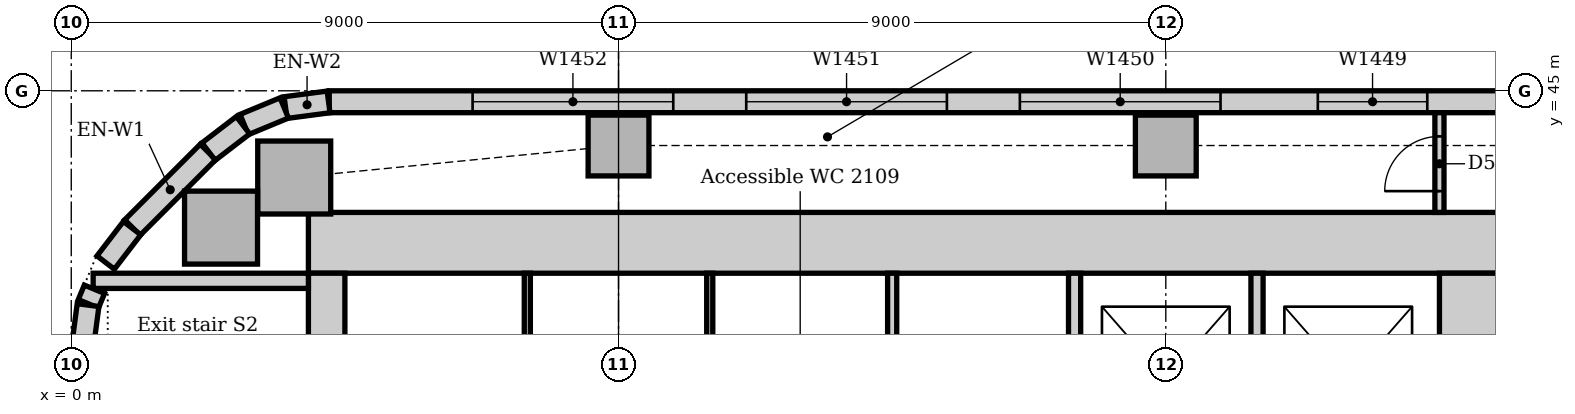
"""IFC4 building model, lengths in metres.
Left out: names, types, materials, properties, quantities, classifications, styles, units other than length and angle.
Written with IfcOpenShell. Run it as: python <this file> out.ifc"""

import sys

from ifc_helpers import new_model, si_unit, direction, frame, frame_2d, origin, origin_2d, place, context, subcontext, project, spatial, rectangle, extrude, element, fill, save


model = new_model("IFC4")
c1 = context("Model", 3, precision=1e-05, world=origin(), true_north=direction((0.0, 1.0)))
c2 = subcontext(c1, "Body", "Model", "MODEL_VIEW")
j1 = project(units=[si_unit("LENGTHUNIT", "METRE"), si_unit("PLANEANGLEUNIT", "RADIAN")], contexts=[c1])
p1 = place(None, origin())
s1 = spatial("IfcSite", under=j1, at=p1, CompositionType="ELEMENT")
p2 = place(p1, origin())
s2 = spatial("IfcBuilding", under=s1, at=p2, CompositionType="ELEMENT")
p3 = place(p2, frame((0.0, 0.0, 91.0)))
s3 = spatial("IfcBuildingStorey", under=s2, at=p3, CompositionType="ELEMENT", Elevation=91.0)
p4 = place(p3, frame((23.5, 42.5, 0.0), z_axis=(0.0, 0.0, 1.0), x_axis=(-1.0, 0.0, 0.0)))
e1 = element("IfcWall", 1, at=p4, inside=s3, PredefinedType="SOLIDWALL", context=c2, shape_type="SweptSolid", body=[
    extrude(rectangle(XDim=19.6, YDim=1.0, at=frame_2d((9.8, 0.0))), origin(), (0.0, 0.0, 1.0), 4.0),
])
p5 = place(p3, frame((23.0, 31.5, 0.0), z_axis=(0.0, 0.0, 1.0), x_axis=(0.0, 1.0, 0.0)))
e2 = element("IfcWall", 2, at=p5, inside=s3, PredefinedType="SOLIDWALL", context=c2, shape_type="SweptSolid", body=[
    extrude(rectangle(XDim=10.5, YDim=1.0, at=frame_2d((5.25, 0.0))), origin(), (0.0, 0.0, 1.0), 4.0),
])
p6 = place(p5, frame((3.15, 0.0, 0.0)))
e3 = element("IfcOpeningElement", 3, at=p6, cuts=e2, PredefinedType="OPENING", context=c2, shape_type="SweptSolid", body=[
    extrude(rectangle(XDim=1.0, YDim=2.1, at=frame_2d((0.5, 1.05))), frame((0.0, 0.51, 0.0), z_axis=(0.0, -1.0, 0.0), x_axis=(1.0, 0.0, 0.0)), (0.0, 0.0, 1.0), 1.02),
])
p7 = place(p5, frame((5.2, 0.0, 0.0)))
e4 = element("IfcOpeningElement", 4, at=p7, cuts=e2, PredefinedType="OPENING", context=c2, shape_type="SweptSolid", body=[
    extrude(rectangle(XDim=1.0, YDim=2.1, at=frame_2d((0.5, 1.05))), frame((0.0, 0.51, 0.0), z_axis=(0.0, -1.0, 0.0), x_axis=(1.0, 0.0, 0.0)), (0.0, 0.0, 1.0), 1.02),
])
p8 = place(p3, frame((4.2, 42.0, 0.0), z_axis=(0.0, 0.0, 1.0), x_axis=(0.0, -1.0, 0.0)))
e5 = element("IfcWall", 5, at=p8, inside=s3, PredefinedType="SOLIDWALL", context=c2, shape_type="SweptSolid", body=[
    extrude(rectangle(XDim=10.5, YDim=0.6, at=frame_2d((5.25, 0.0))), origin(), (0.0, 0.0, 1.0), 4.0),
])
p9 = place(p8, frame((5.3, 0.0, 0.0)))
e6 = element("IfcOpeningElement", 6, at=p9, cuts=e5, PredefinedType="OPENING", context=c2, shape_type="SweptSolid", body=[
    extrude(rectangle(XDim=1.0, YDim=2.1, at=frame_2d((0.5, 1.05))), frame((0.0, 0.31, 0.0), z_axis=(0.0, -1.0, 0.0), x_axis=(1.0, 0.0, 0.0)), (0.0, 0.0, 1.0), 0.62),
])
p10 = place(p3, frame((3.9, 41.875, 0.0), z_axis=(0.0, 0.0, 1.0), x_axis=(-1.0, 0.0, 0.0)))
e7 = element("IfcWall", 7, at=p10, inside=s3, PredefinedType="SOLIDWALL", context=c2, shape_type="SweptSolid", body=[
    extrude(rectangle(XDim=3.54, YDim=0.25, at=frame_2d((1.77, 0.0))), origin(), (0.0, 0.0, 1.0), 4.0),
])
for number, where, z_axis, x_axis in (
    (8, (3.667, 43.574, 0.0), (0.0, 0.0, 1.0), (1.0, 0.0, 0.0)),
    (9, (2.463, 42.75, 0.0), (0.0, 0.0, 1.0), (1.0, 0.0, 0.0)),
):
    element("IfcColumn", number, at=place(p3, frame(where, z_axis=z_axis, x_axis=x_axis)), inside=s3, PredefinedType="COLUMN", context=c2, shape_type="SweptSolid", body=[
        extrude(rectangle(XDim=1.2, YDim=1.2, at=origin_2d()), origin(), (0.0, 0.0, 1.0), 3.7),
    ])
for number, where, z_axis, x_axis in (
    (10, (9.0, 44.1, 0.0), (0.0, 0.0, 1.0), (1.0, 0.0, 0.0)),
    (11, (18.0, 44.1, 0.0), (0.0, 0.0, 1.0), (1.0, 0.0, 0.0)),
):
    element("IfcColumn", number, at=place(p3, frame(where, z_axis=z_axis, x_axis=x_axis)), inside=s3, PredefinedType="COLUMN", context=c2, shape_type="SweptSolid", body=[
        extrude(rectangle(XDim=1.0, YDim=1.0, at=origin_2d()), origin(), (0.0, 0.0, 1.0), 3.7),
    ])
p11 = place(p3, frame((48.257, 44.82, 0.0), z_axis=(0.0, 0.0, 1.0), x_axis=(-1.0, 0.0, 0.0)))
e12 = element("IfcWall", 12, at=p11, inside=s3, PredefinedType="STANDARD", context=c2, shape_type="SweptSolid", body=[
    extrude(rectangle(XDim=44.015, YDim=0.36, at=frame_2d((22.007, 0.0))), origin(), (0.0, 0.0, 1.0), 3.7),
])
p12 = place(p11, frame((2.357, 0.0, 0.9)))
e13 = element("IfcOpeningElement", 13, at=p12, cuts=e12, PredefinedType="OPENING", context=c2, shape_type="SweptSolid", body=[
    extrude(rectangle(XDim=3.3, YDim=1.6, at=frame_2d((1.65, 0.8))), frame((0.0, 0.19, 0.0), z_axis=(0.0, -1.0, 0.0), x_axis=(1.0, 0.0, 0.0)), (0.0, 0.0, 1.0), 0.38),
])
p13 = place(p11, frame((6.857, 0.0, 0.9)))
e14 = element("IfcOpeningElement", 14, at=p13, cuts=e12, PredefinedType="OPENING", context=c2, shape_type="SweptSolid", body=[
    extrude(rectangle(XDim=3.3, YDim=1.6, at=frame_2d((1.65, 0.8))), frame((0.0, 0.19, 0.0), z_axis=(0.0, -1.0, 0.0), x_axis=(1.0, 0.0, 0.0)), (0.0, 0.0, 1.0), 0.38),
])
p14 = place(p11, frame((11.357, 0.0, 0.9)))
e15 = element("IfcOpeningElement", 15, at=p14, cuts=e12, PredefinedType="OPENING", context=c2, shape_type="SweptSolid", body=[
    extrude(rectangle(XDim=3.3, YDim=1.6, at=frame_2d((1.65, 0.8))), frame((0.0, 0.19, 0.0), z_axis=(0.0, -1.0, 0.0), x_axis=(1.0, 0.0, 0.0)), (0.0, 0.0, 1.0), 0.38),
])
p15 = place(p11, frame((15.857, 0.0, 0.9)))
e16 = element("IfcOpeningElement", 16, at=p15, cuts=e12, PredefinedType="OPENING", context=c2, shape_type="SweptSolid", body=[
    extrude(rectangle(XDim=3.3, YDim=1.6, at=frame_2d((1.65, 0.8))), frame((0.0, 0.19, 0.0), z_axis=(0.0, -1.0, 0.0), x_axis=(1.0, 0.0, 0.0)), (0.0, 0.0, 1.0), 0.38),
])
p16 = place(p11, frame((20.357, 0.0, 0.9)))
e17 = element("IfcOpeningElement", 17, at=p16, cuts=e12, PredefinedType="OPENING", context=c2, shape_type="SweptSolid", body=[
    extrude(rectangle(XDim=3.3, YDim=1.6, at=frame_2d((1.65, 0.8))), frame((0.0, 0.19, 0.0), z_axis=(0.0, -1.0, 0.0), x_axis=(1.0, 0.0, 0.0)), (0.0, 0.0, 1.0), 0.38),
])
p17 = place(p11, frame((25.957, 0.0, 0.9)))
e18 = element("IfcOpeningElement", 18, at=p17, cuts=e12, PredefinedType="OPENING", context=c2, shape_type="SweptSolid", body=[
    extrude(rectangle(XDim=1.8, YDim=1.6, at=frame_2d((0.9, 0.8))), frame((0.0, 0.19, 0.0), z_axis=(0.0, -1.0, 0.0), x_axis=(1.0, 0.0, 0.0)), (0.0, 0.0, 1.0), 0.38),
])
p18 = place(p11, frame((29.357, 0.0, 0.9)))
e19 = element("IfcOpeningElement", 19, at=p18, cuts=e12, PredefinedType="OPENING", context=c2, shape_type="SweptSolid", body=[
    extrude(rectangle(XDim=3.3, YDim=1.6, at=frame_2d((1.65, 0.8))), frame((0.0, 0.19, 0.0), z_axis=(0.0, -1.0, 0.0), x_axis=(1.0, 0.0, 0.0)), (0.0, 0.0, 1.0), 0.38),
])
p19 = place(p11, frame((33.857, 0.0, 0.9)))
e20 = element("IfcOpeningElement", 20, at=p19, cuts=e12, PredefinedType="OPENING", context=c2, shape_type="SweptSolid", body=[
    extrude(rectangle(XDim=3.3, YDim=1.6, at=frame_2d((1.65, 0.8))), frame((0.0, 0.19, 0.0), z_axis=(0.0, -1.0, 0.0), x_axis=(1.0, 0.0, 0.0)), (0.0, 0.0, 1.0), 0.38),
])
p20 = place(p11, frame((38.357, 0.0, 0.9)))
e21 = element("IfcOpeningElement", 21, at=p20, cuts=e12, PredefinedType="OPENING", context=c2, shape_type="SweptSolid", body=[
    extrude(rectangle(XDim=3.3, YDim=1.6, at=frame_2d((1.65, 0.8))), frame((0.0, 0.19, 0.0), z_axis=(0.0, -1.0, 0.0), x_axis=(1.0, 0.0, 0.0)), (0.0, 0.0, 1.0), 0.38),
])
p21 = place(p3, frame((2.249, 43.994, 0.0), z_axis=(0.0, 0.0, 1.0), x_axis=(-0.707106781187, -0.707106781187, 0.0)))
e22 = element("IfcWall", 22, at=p21, inside=s3, PredefinedType="STANDARD", context=c2, shape_type="SweptSolid", body=[
    extrude(rectangle(XDim=1.757, YDim=0.36, at=frame_2d((0.879, 0.0))), origin(), (0.0, 0.0, 1.0), 3.7),
])
for number, where, z_axis, x_axis in (
    (23, (4.231, 44.817, 0.0), (0.0, 0.0, 1.0), (-0.991, -0.131, 0.0)),
    (24, (3.503, 44.718, 0.0), (0.0, 0.0, 1.0), (-0.924, -0.383, 0.0)),
):
    element("IfcWall", number, at=place(p3, frame(where, z_axis=z_axis, x_axis=x_axis)), inside=s3, PredefinedType="STANDARD", context=c2, shape_type="SweptSolid", body=[
        extrude(rectangle(XDim=0.713, YDim=0.36, at=frame_2d((0.356, 0.0))), origin(), (0.0, 0.0, 1.0), 3.7),
    ])
for number, where, z_axis, x_axis in (
    (25, (2.825, 44.434, 0.0), (0.0, 0.0, 1.0), (-0.793, -0.609, 0.0)),
    (26, (1.0, 42.741, 0.0), (0.0, 0.0, 1.0), (-0.609, -0.793, 0.0)),
):
    element("IfcWall", number, at=place(p3, frame(where, z_axis=z_axis, x_axis=x_axis)), inside=s3, PredefinedType="STANDARD", context=c2, shape_type="SweptSolid", body=[
        extrude(rectangle(XDim=0.713, YDim=0.36, at=frame_2d((0.357, 0.0))), origin(), (0.0, 0.0, 1.0), 3.7),
    ])
p22 = place(p3, frame((0.381, 41.736, 0.0), z_axis=(0.0, 0.0, 1.0), x_axis=(-0.382773360986, -0.923842277729, 0.0)))
e27 = element("IfcWall", 27, at=p22, inside=s3, PredefinedType="STANDARD", context=c2, shape_type="SweptSolid", body=[
    extrude(rectangle(XDim=0.258, YDim=0.36, at=frame_2d((0.129, 0.0))), origin(), (0.0, 0.0, 1.0), 3.7),
])
p23 = place(p3, frame((0.276, 41.476, 0.0), z_axis=(0.0, 0.0, 1.0), x_axis=(-0.13055608231, -0.99144092581, 0.0)))
e28 = element("IfcWall", 28, at=p23, inside=s3, PredefinedType="STANDARD", context=c2, shape_type="SweptSolid", body=[
    extrude(rectangle(XDim=0.713, YDim=0.36, at=frame_2d((0.356, 0.0))), origin(), (0.0, 0.0, 1.0), 3.7),
])
for number, where, z_axis, x_axis in (
    (29, (16.5, 38.6, 0.0), (0.0, 0.0, 1.0), (0.0, 1.0, 0.0)),
    (30, (19.5, 38.6, 0.0), (0.0, 0.0, 1.0), (0.0, 1.0, 0.0)),
):
    element("IfcWall", number, at=place(p3, frame(where, z_axis=z_axis, x_axis=x_axis)), inside=s3, PredefinedType="PARTITIONING", context=c2, shape_type="SweptSolid", body=[
        extrude(rectangle(XDim=3.4, YDim=0.2, at=frame_2d((1.7, 0.0))), origin(), (0.0, 0.0, 1.0), 3.7),
    ])
p24 = place(p3, frame((22.5, 43.0, 0.0), z_axis=(0.0, 0.0, 1.0), x_axis=(0.0, 1.0, 0.0)))
e31 = element("IfcWall", 31, at=p24, inside=s3, PredefinedType="PARTITIONING", context=c2, shape_type="SweptSolid", body=[
    extrude(rectangle(XDim=1.64, YDim=0.15, at=frame_2d((0.82, 0.0))), origin(), (0.0, 0.0, 1.0), 3.7),
])
p25 = place(p24, frame((0.35, 0.0, 0.0)))
e32 = element("IfcOpeningElement", 32, at=p25, cuts=e31, PredefinedType="OPENING", context=c2, shape_type="SweptSolid", body=[
    extrude(rectangle(XDim=0.9, YDim=2.1, at=frame_2d((0.45, 1.05))), frame((0.0, 0.085, 0.0), z_axis=(0.0, -1.0, 0.0), x_axis=(1.0, 0.0, 0.0)), (0.0, 0.0, 1.0), 0.17),
])
p26 = place(p3, frame((13.5, 38.575, 0.0), z_axis=(0.0, 0.0, 1.0), x_axis=(0.0, 1.0, 0.0)))
e33 = element("IfcWall", 33, at=p26, inside=s3, PredefinedType="PARTITIONING", context=c2, shape_type="SweptSolid", body=[
    extrude(rectangle(XDim=3.425, YDim=0.15, at=frame_2d((1.712, 0.0))), origin(), (0.0, 0.0, 1.0), 3.7),
])
for number, where, z_axis, x_axis in (
    (34, (7.5, 38.575, 0.0), (0.0, 0.0, 1.0), (0.0, 1.0, 0.0)),
    (35, (10.5, 38.575, 0.0), (0.0, 0.0, 1.0), (0.0, 1.0, 0.0)),
):
    element("IfcWall", number, at=place(p3, frame(where, z_axis=z_axis, x_axis=x_axis)), inside=s3, PredefinedType="PARTITIONING", context=c2, shape_type="SweptSolid", body=[
        extrude(rectangle(XDim=3.425, YDim=0.1, at=frame_2d((1.712, 0.0))), origin(), (0.0, 0.0, 1.0), 3.7),
    ])
p27 = place(p17, origin())
e36 = element("IfcWindow", 36, at=p27, inside=s3, PartitioningType="SINGLE_PANEL", PredefinedType="WINDOW", context=c2, shape_type="SweptSolid", body=[
    extrude(rectangle(XDim=1.8, YDim=1.6, at=frame_2d((0.9, 0.8))), frame((0.0, 0.13, 0.0), z_axis=(0.0, -1.0, 0.0), x_axis=(1.0, 0.0, 0.0)), (0.0, 0.0, 1.0), 0.06),
])
fill(e18, e36)
p28 = place(p18, origin())
e37 = element("IfcWindow", 37, at=p28, inside=s3, PartitioningType="SINGLE_PANEL", PredefinedType="WINDOW", context=c2, shape_type="SweptSolid", body=[
    extrude(rectangle(XDim=3.3, YDim=1.6, at=frame_2d((1.65, 0.8))), frame((0.0, 0.13, 0.0), z_axis=(0.0, -1.0, 0.0), x_axis=(1.0, 0.0, 0.0)), (0.0, 0.0, 1.0), 0.06),
])
fill(e19, e37)
p29 = place(p19, origin())
e38 = element("IfcWindow", 38, at=p29, inside=s3, PartitioningType="SINGLE_PANEL", PredefinedType="WINDOW", context=c2, shape_type="SweptSolid", body=[
    extrude(rectangle(XDim=3.3, YDim=1.6, at=frame_2d((1.65, 0.8))), frame((0.0, 0.13, 0.0), z_axis=(0.0, -1.0, 0.0), x_axis=(1.0, 0.0, 0.0)), (0.0, 0.0, 1.0), 0.06),
])
fill(e20, e38)
p30 = place(p20, origin())
e39 = element("IfcWindow", 39, at=p30, inside=s3, PartitioningType="SINGLE_PANEL", PredefinedType="WINDOW", context=c2, shape_type="SweptSolid", body=[
    extrude(rectangle(XDim=3.3, YDim=1.6, at=frame_2d((1.65, 0.8))), frame((0.0, 0.13, 0.0), z_axis=(0.0, -1.0, 0.0), x_axis=(1.0, 0.0, 0.0)), (0.0, 0.0, 1.0), 0.06),
])
fill(e21, e39)
p31 = place(p25, origin())
e40 = element("IfcDoor", 40, at=p31, inside=s3, OperationType="SINGLE_SWING_LEFT", PredefinedType="DOOR", context=c2, shape_type="SweptSolid", body=[
    extrude(rectangle(XDim=0.9, YDim=2.1, at=frame_2d((0.45, 1.05))), frame((0.0, 0.025, 0.0), z_axis=(0.0, -1.0, 0.0), x_axis=(1.0, 0.0, 0.0)), (0.0, 0.0, 1.0), 0.05),
])
fill(e32, e40)
save(model, sys.argv[1])
